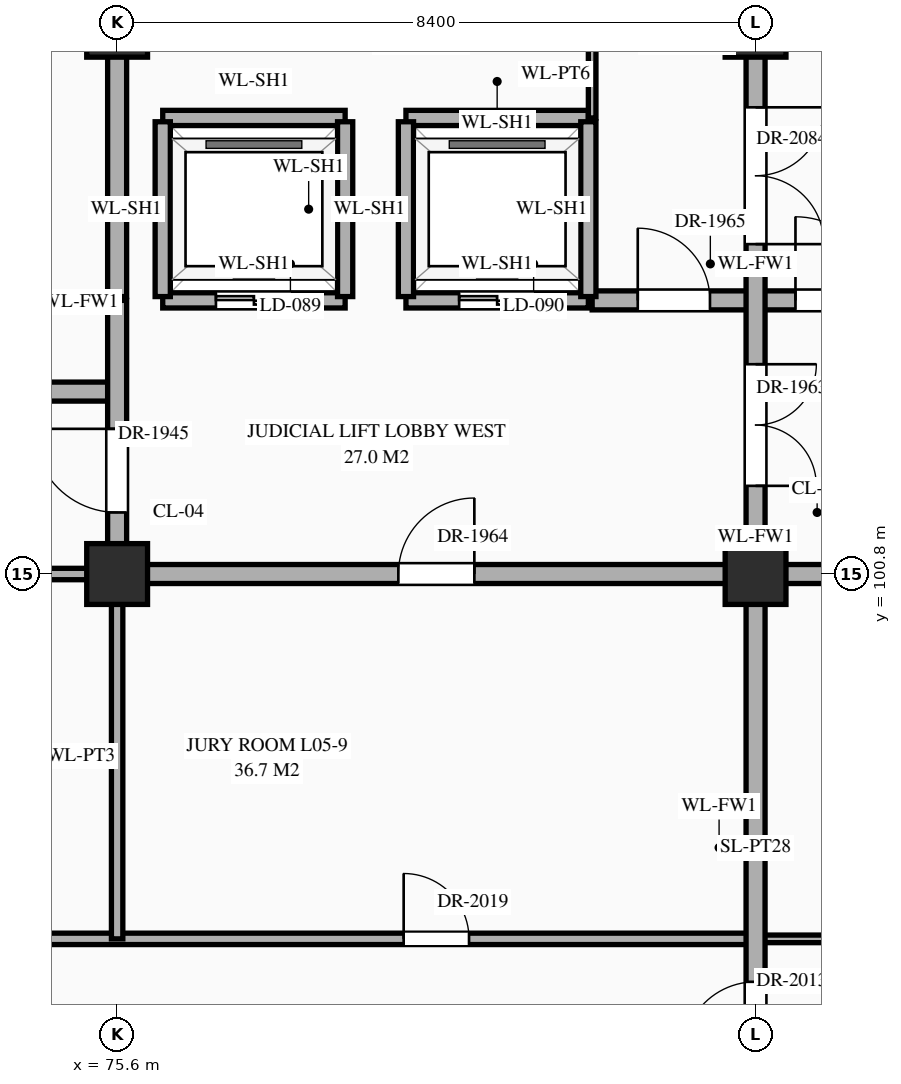
"""IFC4 building model, lengths in metres.
Left out: names, types, materials, properties, quantities, classifications, styles, units other than length and angle.
Written with IfcOpenShell. Run it as: python <this file> out.ifc"""

import sys

from ifc_helpers import new_model, si_unit, direction, frame, frame_2d, origin, origin_2d, place, context, subcontext, project, spatial, rectangle, extrude, element, fill, save


model = new_model("IFC4")
c1 = context("Model", 3, precision=1e-05, world=origin(), true_north=direction((0.0, 1.0)))
c2 = subcontext(c1, "Body", "Model", "MODEL_VIEW")
j1 = project(units=[si_unit("LENGTHUNIT", "METRE"), si_unit("PLANEANGLEUNIT", "RADIAN")], contexts=[c1])
p1 = place(None, origin())
s1 = spatial("IfcSite", under=j1, at=p1, CompositionType="ELEMENT")
p2 = place(p1, origin())
s2 = spatial("IfcBuilding", under=s1, at=p2, CompositionType="ELEMENT")
p3 = place(p2, frame((0.0, 0.0, 21.6)))
s3 = spatial("IfcBuildingStorey", under=s2, at=p3, CompositionType="ELEMENT", Elevation=21.6)
for number, where, z_axis, x_axis in (
    (1, (75.6, 100.8, 0.0), (0.0, 0.0, 1.0), (1.0, 0.0, 0.0)),
    (2, (75.6, 108.0, 0.0), (0.0, 0.0, 1.0), (1.0, 0.0, 0.0)),
    (3, (84.0, 100.8, 0.0), (0.0, 0.0, 1.0), (1.0, 0.0, 0.0)),
    (4, (84.0, 108.0, 0.0), (0.0, 0.0, 1.0), (1.0, 0.0, 0.0)),
):
    element("IfcColumn", number, at=place(p3, frame(where, z_axis=z_axis, x_axis=x_axis)), inside=s3, PredefinedType="COLUMN", context=c2, shape_type="SweptSolid", body=[
        extrude(rectangle(XDim=0.8, YDim=0.8, at=origin_2d()), origin(), (0.0, 0.0, 1.0), 4.5),
    ])
p4 = place(p3, frame((56.2, 96.0, 0.0), z_axis=(0.0, 0.0, 1.0), x_axis=(1.0, 0.0, 0.0)))
e5 = element("IfcWall", 5, at=p4, inside=s3, PredefinedType="STANDARD", context=c2, shape_type="SweptSolid", body=[
    extrude(rectangle(XDim=27.8, YDim=0.15, at=frame_2d((13.9, 0.0))), origin(), (0.0, 0.0, 1.0), 4.24),
])
p5 = place(p4, frame((0.77, 0.0, 0.0)))
e6 = element("IfcOpeningElement", 6, at=p5, cuts=e5, PredefinedType="OPENING", context=c2, shape_type="SweptSolid", body=[
    extrude(rectangle(XDim=1.06, YDim=2.4, at=frame_2d((0.53, 1.2))), frame((0.0, 0.087, 0.0), z_axis=(0.0, -1.0, 0.0), x_axis=(1.0, 0.0, 0.0)), (0.0, 0.0, 1.0), 0.174),
])
p6 = place(p4, frame((6.23, 0.0, 0.0)))
e7 = element("IfcOpeningElement", 7, at=p6, cuts=e5, PredefinedType="OPENING", context=c2, shape_type="SweptSolid", body=[
    extrude(rectangle(XDim=1.14, YDim=2.4, at=frame_2d((0.57, 1.2))), frame((0.0, 0.087, 0.0), z_axis=(0.0, -1.0, 0.0), x_axis=(1.0, 0.0, 0.0)), (0.0, 0.0, 1.0), 0.174),
])
p7 = place(p4, frame((14.75, 0.0, 0.0)))
e8 = element("IfcOpeningElement", 8, at=p7, cuts=e5, PredefinedType="OPENING", context=c2, shape_type="SweptSolid", body=[
    extrude(rectangle(XDim=0.9, YDim=2.15, at=frame_2d((0.45, 1.075))), frame((0.0, 0.087, 0.0), z_axis=(0.0, -1.0, 0.0), x_axis=(1.0, 0.0, 0.0)), (0.0, 0.0, 1.0), 0.174),
])
p8 = place(p4, frame((23.17, 0.0, 0.0)))
e9 = element("IfcOpeningElement", 9, at=p8, cuts=e5, PredefinedType="OPENING", context=c2, shape_type="SweptSolid", body=[
    extrude(rectangle(XDim=0.86, YDim=2.1, at=frame_2d((0.43, 1.05))), frame((0.0, 0.087, 0.0), z_axis=(0.0, -1.0, 0.0), x_axis=(1.0, 0.0, 0.0)), (0.0, 0.0, 1.0), 0.174),
])
p9 = place(p3, frame((84.0, 96.0, 0.0), z_axis=(0.0, 0.0, 1.0), x_axis=(1.0, 0.0, 0.0)))
e10 = element("IfcWall", 10, at=p9, inside=s3, PredefinedType="STANDARD", context=c2, shape_type="SweptSolid", body=[
    extrude(rectangle(XDim=5.8, YDim=0.1, at=frame_2d((2.9, 0.0))), origin(), (0.0, 0.0, 1.0), 4.24),
])
p10 = place(p9, frame((1.16, 0.0, 0.0)))
e11 = element("IfcOpeningElement", 11, at=p10, cuts=e10, PredefinedType="OPENING", context=c2, shape_type="SweptSolid", body=[
    extrude(rectangle(XDim=1.08, YDim=2.25, at=frame_2d((0.54, 1.125))), frame((0.0, 0.062, 0.0), z_axis=(0.0, -1.0, 0.0), x_axis=(1.0, 0.0, 0.0)), (0.0, 0.0, 1.0), 0.124),
])
p11 = place(p9, frame((4.04, 0.0, 0.0)))
e12 = element("IfcOpeningElement", 12, at=p11, cuts=e10, PredefinedType="OPENING", context=c2, shape_type="SweptSolid", body=[
    extrude(rectangle(XDim=1.12, YDim=2.25, at=frame_2d((0.56, 1.125))), frame((0.0, 0.062, 0.0), z_axis=(0.0, -1.0, 0.0), x_axis=(1.0, 0.0, 0.0)), (0.0, 0.0, 1.0), 0.124),
])
p12 = place(p3, frame((71.4, 100.8, 0.0), z_axis=(0.0, 0.0, 1.0), x_axis=(1.0, 0.0, 0.0)))
e13 = element("IfcWall", 13, at=p12, inside=s3, PredefinedType="STANDARD", context=c2, shape_type="SweptSolid", body=[
    extrude(rectangle(XDim=4.2, YDim=0.15, at=frame_2d((2.1, 0.0))), origin(), (0.0, 0.0, 1.0), 3.39),
])
p13 = place(p12, frame((1.45, 0.0, 0.0)))
e14 = element("IfcOpeningElement", 14, at=p13, cuts=e13, PredefinedType="OPENING", context=c2, shape_type="SweptSolid", body=[
    extrude(rectangle(XDim=0.98, YDim=2.35, at=frame_2d((0.49, 1.175))), frame((0.0, 0.087, 0.0), z_axis=(0.0, -1.0, 0.0), x_axis=(1.0, 0.0, 0.0)), (0.0, 0.0, 1.0), 0.174),
])
p14 = place(p3, frame((75.6, 100.8, 0.0), z_axis=(0.0, 0.0, 1.0), x_axis=(1.0, 0.0, 0.0)))
e15 = element("IfcWall", 15, at=p14, inside=s3, PredefinedType="STANDARD", context=c2, shape_type="SweptSolid", body=[
    extrude(rectangle(XDim=16.8, YDim=0.25, at=frame_2d((8.4, 0.0))), origin(), (0.0, 0.0, 1.0), 3.39),
])
p15 = place(p14, frame((3.7, 0.0, 0.0)))
e16 = element("IfcOpeningElement", 16, at=p15, cuts=e15, PredefinedType="OPENING", context=c2, shape_type="SweptSolid", body=[
    extrude(rectangle(XDim=1.0, YDim=2.2, at=frame_2d((0.5, 1.1))), frame((0.0, 0.137, 0.0), z_axis=(0.0, -1.0, 0.0), x_axis=(1.0, 0.0, 0.0)), (0.0, 0.0, 1.0), 0.274),
])
p16 = place(p14, frame((9.71, 0.0, 0.0)))
e17 = element("IfcOpeningElement", 17, at=p16, cuts=e15, PredefinedType="OPENING", context=c2, shape_type="SweptSolid", body=[
    extrude(rectangle(XDim=1.1, YDim=2.2, at=frame_2d((0.55, 1.1))), frame((0.0, 0.137, 0.0), z_axis=(0.0, -1.0, 0.0), x_axis=(1.0, 0.0, 0.0)), (0.0, 0.0, 1.0), 0.274),
])
p17 = place(p14, frame((12.5, 0.0, 0.0)))
e18 = element("IfcOpeningElement", 18, at=p17, cuts=e15, PredefinedType="OPENING", context=c2, shape_type="SweptSolid", body=[
    extrude(rectangle(XDim=1.0, YDim=2.2, at=frame_2d((0.5, 1.1))), frame((0.0, 0.137, 0.0), z_axis=(0.0, -1.0, 0.0), x_axis=(1.0, 0.0, 0.0)), (0.0, 0.0, 1.0), 0.274),
])
p18 = place(p14, frame((14.865, 0.0, 0.0)))
e19 = element("IfcOpeningElement", 19, at=p18, cuts=e15, PredefinedType="OPENING", context=c2, shape_type="SweptSolid", body=[
    extrude(rectangle(XDim=0.95, YDim=2.15, at=frame_2d((0.475, 1.075))), frame((0.0, 0.137, 0.0), z_axis=(0.0, -1.0, 0.0), x_axis=(1.0, 0.0, 0.0)), (0.0, 0.0, 1.0), 0.274),
])
p19 = place(p3, frame((71.4, 103.2, 0.0), z_axis=(0.0, 0.0, 1.0), x_axis=(1.0, 0.0, 0.0)))
e20 = element("IfcWall", 20, at=p19, inside=s3, PredefinedType="STANDARD", context=c2, shape_type="SweptSolid", body=[
    extrude(rectangle(XDim=4.2, YDim=0.25, at=frame_2d((2.1, 0.0))), origin(), (0.0, 0.0, 1.0), 4.24),
])
p20 = place(p19, frame((1.625, 0.0, 0.0)))
e21 = element("IfcOpeningElement", 21, at=p20, cuts=e20, PredefinedType="OPENING", context=c2, shape_type="SweptSolid", body=[
    extrude(rectangle(XDim=0.95, YDim=2.15, at=frame_2d((0.475, 1.075))), frame((0.0, 0.137, 0.0), z_axis=(0.0, -1.0, 0.0), x_axis=(1.0, 0.0, 0.0)), (0.0, 0.0, 1.0), 0.274),
])
p21 = place(p3, frame((76.2, 104.4, 0.0), z_axis=(0.0, 0.0, 1.0), x_axis=(1.0, 0.0, 0.0)))
e22 = element("IfcWall", 22, at=p21, inside=s3, PredefinedType="STANDARD", context=c2, shape_type="SweptSolid", body=[
    extrude(rectangle(XDim=2.4, YDim=0.2, at=frame_2d((1.2, 0.0))), origin(), (0.0, 0.0, 1.0), 4.24),
])
p22 = place(p21, frame((0.7, 0.0, 0.0)))
e23 = element("IfcOpeningElement", 23, at=p22, cuts=e22, PredefinedType="OPENING", context=c2, shape_type="SweptSolid", body=[
    extrude(rectangle(XDim=1.0, YDim=2.15, at=frame_2d((0.5, 1.075))), frame((0.0, 0.112, 0.0), z_axis=(0.0, -1.0, 0.0), x_axis=(1.0, 0.0, 0.0)), (0.0, 0.0, 1.0), 0.224),
])
p23 = place(p3, frame((79.4, 104.4, 0.0), z_axis=(0.0, 0.0, 1.0), x_axis=(1.0, 0.0, 0.0)))
e24 = element("IfcWall", 24, at=p23, inside=s3, PredefinedType="STANDARD", context=c2, shape_type="SweptSolid", body=[
    extrude(rectangle(XDim=2.4, YDim=0.2, at=frame_2d((1.2, 0.0))), origin(), (0.0, 0.0, 1.0), 4.24),
])
p24 = place(p23, frame((0.7, 0.0, 0.0)))
e25 = element("IfcOpeningElement", 25, at=p24, cuts=e24, PredefinedType="OPENING", context=c2, shape_type="SweptSolid", body=[
    extrude(rectangle(XDim=1.0, YDim=2.15, at=frame_2d((0.5, 1.075))), frame((0.0, 0.112, 0.0), z_axis=(0.0, -1.0, 0.0), x_axis=(1.0, 0.0, 0.0)), (0.0, 0.0, 1.0), 0.224),
])
p25 = place(p3, frame((81.85, 104.4, 0.0), z_axis=(0.0, 0.0, 1.0), x_axis=(1.0, 0.0, 0.0)))
e26 = element("IfcWall", 26, at=p25, inside=s3, PredefinedType="STANDARD", context=c2, shape_type="SweptSolid", body=[
    extrude(rectangle(XDim=4.3, YDim=0.25, at=frame_2d((2.15, 0.0))), origin(), (0.0, 0.0, 1.0), 4.24),
])
p26 = place(p25, frame((0.6, 0.0, 0.0)))
e27 = element("IfcOpeningElement", 27, at=p26, cuts=e26, PredefinedType="OPENING", context=c2, shape_type="SweptSolid", body=[
    extrude(rectangle(XDim=0.95, YDim=2.15, at=frame_2d((0.475, 1.075))), frame((0.0, 0.137, 0.0), z_axis=(0.0, -1.0, 0.0), x_axis=(1.0, 0.0, 0.0)), (0.0, 0.0, 1.0), 0.274),
])
p27 = place(p25, frame((2.675, 0.0, 0.0)))
e28 = element("IfcOpeningElement", 28, at=p27, cuts=e26, PredefinedType="OPENING", context=c2, shape_type="SweptSolid", body=[
    extrude(rectangle(XDim=1.1, YDim=2.2, at=frame_2d((0.55, 1.1))), frame((0.0, 0.137, 0.0), z_axis=(0.0, -1.0, 0.0), x_axis=(1.0, 0.0, 0.0)), (0.0, 0.0, 1.0), 0.274),
])
for number, where, z_axis, x_axis in (
    (29, (76.2, 106.8, 0.0), (0.0, 0.0, 1.0), (1.0, 0.0, 0.0)),
    (30, (79.4, 106.8, 0.0), (0.0, 0.0, 1.0), (1.0, 0.0, 0.0)),
):
    element("IfcWall", number, at=place(p3, frame(where, z_axis=z_axis, x_axis=x_axis)), inside=s3, PredefinedType="STANDARD", context=c2, shape_type="SweptSolid", body=[
        extrude(rectangle(XDim=2.4, YDim=0.2, at=frame_2d((1.2, 0.0))), origin(), (0.0, 0.0, 1.0), 4.24),
    ])
p28 = place(p3, frame((75.6, 96.0, 0.0), z_axis=(0.0, 0.0, 1.0), x_axis=(0.0, 1.0, 0.0)))
e31 = element("IfcWall", 31, at=p28, inside=s3, PredefinedType="STANDARD", context=c2, shape_type="SweptSolid", body=[
    extrude(rectangle(XDim=4.8, YDim=0.15, at=frame_2d((2.4, 0.0))), origin(), (0.0, 0.0, 1.0), 3.49),
])
p29 = place(p3, frame((75.6, 100.8, 0.0), z_axis=(0.0, 0.0, 1.0), x_axis=(0.0, 1.0, 0.0)))
e32 = element("IfcWall", 32, at=p29, inside=s3, PredefinedType="STANDARD", context=c2, shape_type="SweptSolid", body=[
    extrude(rectangle(XDim=3.6, YDim=0.25, at=frame_2d((1.8, 0.0))), origin(), (0.0, 0.0, 1.0), 3.49),
])
p30 = place(p29, frame((0.81, 0.0, 0.0)))
e33 = element("IfcOpeningElement", 33, at=p30, cuts=e32, PredefinedType="OPENING", context=c2, shape_type="SweptSolid", body=[
    extrude(rectangle(XDim=1.1, YDim=2.2, at=frame_2d((0.55, 1.1))), frame((0.0, 0.137, 0.0), z_axis=(0.0, -1.0, 0.0), x_axis=(1.0, 0.0, 0.0)), (0.0, 0.0, 1.0), 0.274),
])
p31 = place(p3, frame((75.6, 104.45, 0.0), z_axis=(0.0, 0.0, 1.0), x_axis=(0.0, 1.0, 0.0)))
e34 = element("IfcWall", 34, at=p31, inside=s3, PredefinedType="STANDARD", context=c2, shape_type="SweptSolid", body=[
    extrude(rectangle(XDim=3.5, YDim=0.25, at=frame_2d((1.75, 0.0))), origin(), (0.0, 0.0, 1.0), 3.49),
])
for number, where, z_axis, x_axis in (
    (35, (76.2, 104.45, 0.0), (0.0, 0.0, 1.0), (0.0, 1.0, 0.0)),
    (36, (78.6, 104.45, 0.0), (0.0, 0.0, 1.0), (0.0, 1.0, 0.0)),
    (37, (79.4, 104.45, 0.0), (0.0, 0.0, 1.0), (0.0, 1.0, 0.0)),
    (38, (81.8, 104.45, 0.0), (0.0, 0.0, 1.0), (0.0, 1.0, 0.0)),
):
    element("IfcWall", number, at=place(p3, frame(where, z_axis=z_axis, x_axis=x_axis)), inside=s3, PredefinedType="STANDARD", context=c2, shape_type="SweptSolid", body=[
        extrude(rectangle(XDim=2.3, YDim=0.2, at=frame_2d((1.15, 0.0))), origin(), (0.0, 0.0, 1.0), 4.24),
    ])
p32 = place(p3, frame((81.85, 106.8, 0.0), z_axis=(0.0, 0.0, 1.0), x_axis=(0.0, 1.0, 0.0)))
e39 = element("IfcWall", 39, at=p32, inside=s3, PredefinedType="STANDARD", context=c2, shape_type="SweptSolid", body=[
    extrude(rectangle(XDim=1.15, YDim=0.1, at=frame_2d((0.575, 0.0))), origin(), (0.0, 0.0, 1.0), 4.24),
])
p33 = place(p3, frame((84.0, 79.24, 0.0), z_axis=(0.0, 0.0, 1.0), x_axis=(0.0, 1.0, 0.0)))
e40 = element("IfcWall", 40, at=p33, inside=s3, PredefinedType="STANDARD", context=c2, shape_type="SweptSolid", body=[
    extrude(rectangle(XDim=35.92, YDim=0.25, at=frame_2d((17.96, 0.0))), origin(), (0.0, 0.0, 1.0), 3.49),
])
p34 = place(p33, frame((22.72, 0.0, 0.0)))
e41 = element("IfcOpeningElement", 41, at=p34, cuts=e40, PredefinedType="OPENING", context=c2, shape_type="SweptSolid", body=[
    extrude(rectangle(XDim=1.6, YDim=2.3, at=frame_2d((0.8, 1.15))), frame((0.0, 0.137, 0.0), z_axis=(0.0, -1.0, 0.0), x_axis=(1.0, 0.0, 0.0)), (0.0, 0.0, 1.0), 0.274),
])
p35 = place(p33, frame((12.45, 0.0, 0.0)))
e42 = element("IfcOpeningElement", 42, at=p35, cuts=e40, PredefinedType="OPENING", context=c2, shape_type="SweptSolid", body=[
    extrude(rectangle(XDim=1.1, YDim=2.2, at=frame_2d((0.55, 1.1))), frame((0.0, 0.137, 0.0), z_axis=(0.0, -1.0, 0.0), x_axis=(1.0, 0.0, 0.0)), (0.0, 0.0, 1.0), 0.274),
])
p36 = place(p33, frame((15.245, 0.0, 0.0)))
e43 = element("IfcOpeningElement", 43, at=p36, cuts=e40, PredefinedType="OPENING", context=c2, shape_type="SweptSolid", body=[
    extrude(rectangle(XDim=0.95, YDim=2.15, at=frame_2d((0.475, 1.075))), frame((0.0, 0.137, 0.0), z_axis=(0.0, -1.0, 0.0), x_axis=(1.0, 0.0, 0.0)), (0.0, 0.0, 1.0), 0.274),
])
p37 = place(p33, frame((25.9, 0.0, 0.0)))
e44 = element("IfcOpeningElement", 44, at=p37, cuts=e40, PredefinedType="OPENING", context=c2, shape_type="SweptSolid", body=[
    extrude(rectangle(XDim=1.8, YDim=2.35, at=frame_2d((0.9, 1.175))), frame((0.0, 0.137, 0.0), z_axis=(0.0, -1.0, 0.0), x_axis=(1.0, 0.0, 0.0)), (0.0, 0.0, 1.0), 0.274),
])
p38 = place(p33, frame((29.62, 0.0, 0.0)))
e45 = element("IfcOpeningElement", 45, at=p38, cuts=e40, PredefinedType="OPENING", context=c2, shape_type="SweptSolid", body=[
    extrude(rectangle(XDim=1.0, YDim=2.2, at=frame_2d((0.5, 1.1))), frame((0.0, 0.137, 0.0), z_axis=(0.0, -1.0, 0.0), x_axis=(1.0, 0.0, 0.0)), (0.0, 0.0, 1.0), 0.274),
])
p39 = place(p33, frame((5.3, 0.0, 0.0)))
e46 = element("IfcOpeningElement", 46, at=p39, cuts=e40, PredefinedType="OPENING", context=c2, shape_type="SweptSolid", body=[
    extrude(rectangle(XDim=1.0, YDim=2.2, at=frame_2d((0.5, 1.1))), frame((0.0, 0.137, 0.0), z_axis=(0.0, -1.0, 0.0), x_axis=(1.0, 0.0, 0.0)), (0.0, 0.0, 1.0), 0.274),
])
p40 = place(p22, origin())
e47 = element("IfcDoor", 47, at=p40, inside=s3, OperationType="DOUBLE_DOOR_SLIDING", PredefinedType="DOOR", context=c2, shape_type="SweptSolid", body=[
    extrude(rectangle(XDim=1.0, YDim=2.15, at=frame_2d((0.5, 1.075))), frame((0.0, 0.025, 0.0), z_axis=(0.0, -1.0, 0.0), x_axis=(1.0, 0.0, 0.0)), (0.0, 0.0, 1.0), 0.05),
])
fill(e23, e47)
p41 = place(p24, origin())
e48 = element("IfcDoor", 48, at=p41, inside=s3, OperationType="DOUBLE_DOOR_SLIDING", PredefinedType="DOOR", context=c2, shape_type="SweptSolid", body=[
    extrude(rectangle(XDim=1.0, YDim=2.15, at=frame_2d((0.5, 1.075))), frame((0.0, 0.025, 0.0), z_axis=(0.0, -1.0, 0.0), x_axis=(1.0, 0.0, 0.0)), (0.0, 0.0, 1.0), 0.05),
])
fill(e25, e48)
p42 = place(p30, origin())
e49 = element("IfcDoor", 49, at=p42, inside=s3, OperationType="SINGLE_SWING_RIGHT", PredefinedType="DOOR", context=c2, shape_type="SweptSolid", body=[
    extrude(rectangle(XDim=1.1, YDim=2.2, at=frame_2d((0.55, 1.1))), frame((0.0, 0.025, 0.0), z_axis=(0.0, -1.0, 0.0), x_axis=(1.0, 0.0, 0.0)), (0.0, 0.0, 1.0), 0.05),
])
fill(e33, e49)
p43 = place(p34, frame((1.6, 0.0, 0.0), z_axis=(0.0, 0.0, 1.0), x_axis=(-1.0, 0.0, 0.0)))
e50 = element("IfcDoor", 50, at=p43, inside=s3, OperationType="DOUBLE_DOOR_SINGLE_SWING", PredefinedType="DOOR", context=c2, shape_type="SweptSolid", body=[
    extrude(rectangle(XDim=1.6, YDim=2.3, at=frame_2d((0.8, 1.15))), frame((0.0, 0.025, 0.0), z_axis=(0.0, -1.0, 0.0), x_axis=(1.0, 0.0, 0.0)), (0.0, 0.0, 1.0), 0.05),
])
fill(e41, e50)
p44 = place(p15, origin())
e51 = element("IfcDoor", 51, at=p44, inside=s3, OperationType="SINGLE_SWING_RIGHT", PredefinedType="DOOR", context=c2, shape_type="SweptSolid", body=[
    extrude(rectangle(XDim=1.0, YDim=2.2, at=frame_2d((0.5, 1.1))), frame((0.0, 0.025, 0.0), z_axis=(0.0, -1.0, 0.0), x_axis=(1.0, 0.0, 0.0)), (0.0, 0.0, 1.0), 0.05),
])
fill(e16, e51)
p45 = place(p26, origin())
e52 = element("IfcDoor", 52, at=p45, inside=s3, OperationType="SINGLE_SWING_LEFT", PredefinedType="DOOR", context=c2, shape_type="SweptSolid", body=[
    extrude(rectangle(XDim=0.95, YDim=2.15, at=frame_2d((0.475, 1.075))), frame((0.0, 0.025, 0.0), z_axis=(0.0, -1.0, 0.0), x_axis=(1.0, 0.0, 0.0)), (0.0, 0.0, 1.0), 0.05),
])
fill(e27, e52)
p46 = place(p27, origin())
e53 = element("IfcDoor", 53, at=p46, inside=s3, OperationType="SINGLE_SWING_LEFT", PredefinedType="DOOR", context=c2, shape_type="SweptSolid", body=[
    extrude(rectangle(XDim=1.1, YDim=2.2, at=frame_2d((0.55, 1.1))), frame((0.0, 0.025, 0.0), z_axis=(0.0, -1.0, 0.0), x_axis=(1.0, 0.0, 0.0)), (0.0, 0.0, 1.0), 0.05),
])
fill(e28, e53)
p47 = place(p36, origin())
e54 = element("IfcDoor", 54, at=p47, inside=s3, OperationType="SINGLE_SWING_LEFT", PredefinedType="DOOR", context=c2, shape_type="SweptSolid", body=[
    extrude(rectangle(XDim=0.95, YDim=2.15, at=frame_2d((0.475, 1.075))), frame((0.0, 0.025, 0.0), z_axis=(0.0, -1.0, 0.0), x_axis=(1.0, 0.0, 0.0)), (0.0, 0.0, 1.0), 0.05),
])
fill(e43, e54)
p48 = place(p8, origin())
e55 = element("IfcDoor", 55, at=p48, inside=s3, OperationType="SINGLE_SWING_LEFT", PredefinedType="DOOR", context=c2, shape_type="SweptSolid", body=[
    extrude(rectangle(XDim=0.86, YDim=2.1, at=frame_2d((0.43, 1.05))), frame((0.0, 0.025, 0.0), z_axis=(0.0, -1.0, 0.0), x_axis=(1.0, 0.0, 0.0)), (0.0, 0.0, 1.0), 0.05),
])
fill(e9, e55)
p49 = place(p37, frame((1.8, 0.0, 0.0), z_axis=(0.0, 0.0, 1.0), x_axis=(-1.0, 0.0, 0.0)))
e56 = element("IfcDoor", 56, at=p49, inside=s3, OperationType="DOUBLE_DOOR_SINGLE_SWING", PredefinedType="DOOR", context=c2, shape_type="SweptSolid", body=[
    extrude(rectangle(XDim=1.8, YDim=2.35, at=frame_2d((0.9, 1.175))), frame((0.0, 0.025, 0.0), z_axis=(0.0, -1.0, 0.0), x_axis=(1.0, 0.0, 0.0)), (0.0, 0.0, 1.0), 0.05),
])
fill(e44, e56)
save(model, sys.argv[1])
